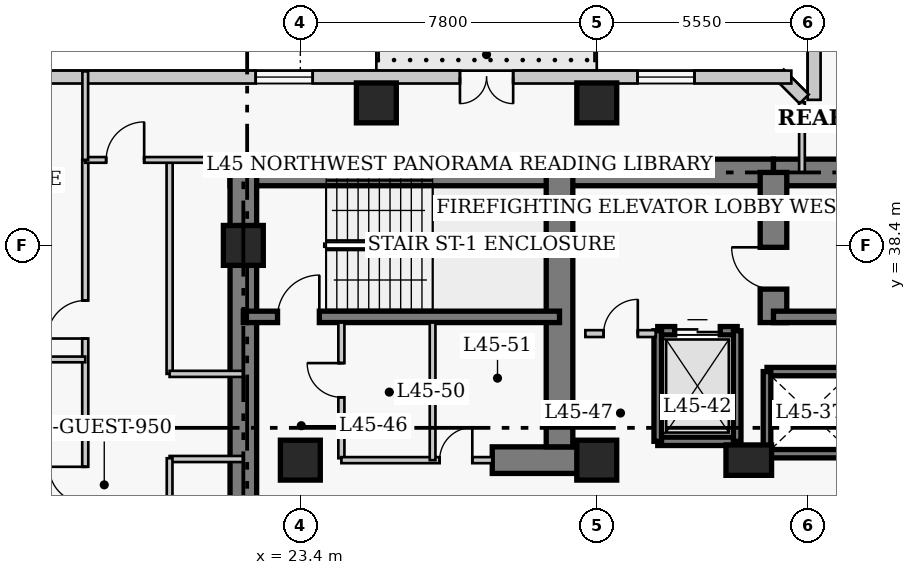
"""IFC4 building model, lengths in metres.
Left out: names, types, materials, properties, quantities, classifications, styles, units other than length and angle.
Written with IfcOpenShell. Run it as: python <this file> out.ifc"""

import sys

from ifc_helpers import new_model, si_unit, direction, frame, frame_2d, origin, origin_2d, place, context, subcontext, project, spatial, rectangle, extrude, element, fill, save


model = new_model("IFC4")
c1 = context("Model", 3, precision=1e-05, world=origin(), true_north=direction((0.0, 1.0)))
c2 = subcontext(c1, "Body", "Model", "MODEL_VIEW")
j1 = project(units=[si_unit("LENGTHUNIT", "METRE"), si_unit("PLANEANGLEUNIT", "RADIAN")], contexts=[c1])
p1 = place(None, origin())
s1 = spatial("IfcSite", under=j1, at=p1, CompositionType="ELEMENT")
p2 = place(p1, origin())
s2 = spatial("IfcBuilding", under=s1, at=p2, CompositionType="ELEMENT")
p3 = place(p2, frame((0.0, 0.0, 180.2)))
s3 = spatial("IfcBuildingStorey", under=s2, at=p3, CompositionType="ELEMENT", Elevation=180.2)
p4 = place(p3, frame((21.55, 40.32, 0.0), z_axis=(0.0, 0.0, 1.0), x_axis=(1.0, 0.0, 0.0)))
e1 = element("IfcWall", 1, at=p4, inside=s3, PredefinedType="SHEAR", context=c2, shape_type="SweptSolid", body=[
    extrude(rectangle(XDim=14.3, YDim=0.7, at=frame_2d((7.15, 0.0))), origin(), (0.0, 0.0, 1.0), 3.8),
])
p5 = place(p3, frame((35.85, 40.32, 0.0), z_axis=(0.0, 0.0, 1.0), x_axis=(1.0, 0.0, 0.0)))
e2 = element("IfcWall", 2, at=p5, inside=s3, PredefinedType="SHEAR", context=c2, shape_type="SweptSolid", body=[
    extrude(rectangle(XDim=12.6, YDim=0.7, at=frame_2d((6.3, 0.0))), origin(), (0.0, 0.0, 1.0), 3.8),
])
p6 = place(p3, frame((21.9, 27.05, 0.0), z_axis=(0.0, 0.0, 1.0), x_axis=(0.0, 1.0, 0.0)))
e3 = element("IfcWall", 3, at=p6, inside=s3, PredefinedType="SHEAR", context=c2, shape_type="SweptSolid", body=[
    extrude(rectangle(XDim=13.62, YDim=0.7, at=frame_2d((6.81, 0.0))), origin(), (0.0, 0.0, 1.0), 3.8),
])
p7 = place(p3, frame((28.45, 32.75, 0.0), z_axis=(0.0, 0.0, 1.0), x_axis=(1.0, 0.0, 0.0)))
e4 = element("IfcWall", 4, at=p7, inside=s3, PredefinedType="SHEAR", context=c2, shape_type="SweptSolid", body=[
    extrude(rectangle(XDim=2.4, YDim=0.7, at=frame_2d((1.2, 0.0))), origin(), (0.0, 0.0, 1.0), 3.8),
])
p8 = place(p3, frame((30.22, 33.1, 0.0), z_axis=(0.0, 0.0, 1.0), x_axis=(0.0, 1.0, 0.0)))
e5 = element("IfcWall", 5, at=p8, inside=s3, PredefinedType="SHEAR", context=c2, shape_type="SweptSolid", body=[
    extrude(rectangle(XDim=7.22, YDim=0.7, at=frame_2d((3.61, 0.0))), origin(), (0.0, 0.0, 1.0), 3.8),
])
p9 = place(p3, frame((35.85, 36.37, 0.0), z_axis=(0.0, 0.0, 1.0), x_axis=(0.0, 1.0, 0.0)))
e6 = element("IfcWall", 6, at=p9, inside=s3, PredefinedType="SHEAR", context=c2, shape_type="SweptSolid", body=[
    extrude(rectangle(XDim=3.95, YDim=0.7, at=frame_2d((1.975, 0.0))), origin(), (0.0, 0.0, 1.0), 3.8),
])
p10 = place(p9, frame((0.88, 0.0, 0.0)))
e7 = element("IfcOpeningElement", 7, at=p10, cuts=e6, PredefinedType="OPENING", context=c2, shape_type="SweptSolid", body=[
    extrude(rectangle(XDim=1.1, YDim=2.15, at=frame_2d((0.55, 1.075))), frame((0.0, 0.36, 0.0), z_axis=(0.0, -1.0, 0.0), x_axis=(1.0, 0.0, 0.0)), (0.0, 0.0, 1.0), 0.72),
])
p11 = place(p3, frame((21.9, 36.52, 0.0), z_axis=(0.0, 0.0, 1.0), x_axis=(1.0, 0.0, 0.0)))
e8 = element("IfcWall", 8, at=p11, inside=s3, PredefinedType="SHEAR", context=c2, shape_type="SweptSolid", body=[
    extrude(rectangle(XDim=8.32, YDim=0.3, at=frame_2d((4.16, 0.0))), origin(), (0.0, 0.0, 1.0), 3.8),
])
p12 = place(p11, frame((0.9, 0.0, 0.0)))
e9 = element("IfcOpeningElement", 9, at=p12, cuts=e8, PredefinedType="OPENING", context=c2, shape_type="SweptSolid", body=[
    extrude(rectangle(XDim=1.1, YDim=2.15, at=frame_2d((0.55, 1.075))), frame((0.0, 0.16, 0.0), z_axis=(0.0, -1.0, 0.0), x_axis=(1.0, 0.0, 0.0)), (0.0, 0.0, 1.0), 0.32),
])
p13 = place(p3, frame((35.85, 36.52, 0.0), z_axis=(0.0, 0.0, 1.0), x_axis=(1.0, 0.0, 0.0)))
e10 = element("IfcWall", 10, at=p13, inside=s3, PredefinedType="SHEAR", context=c2, shape_type="SweptSolid", body=[
    extrude(rectangle(XDim=8.33, YDim=0.3, at=frame_2d((4.165, 0.0))), origin(), (0.0, 0.0, 1.0), 3.8),
])
for number, where, z_axis, x_axis in (
    (11, (21.9, 38.4, 0.0), (0.0, 0.0, 1.0), (1.0, 0.0, 0.0)),
    (12, (23.4, 32.75, 0.0), (0.0, 0.0, 1.0), (1.0, 0.0, 0.0)),
    (13, (31.2, 32.75, 0.0), (0.0, 0.0, 1.0), (1.0, 0.0, 0.0)),
):
    element("IfcColumn", number, at=place(p3, frame(where, z_axis=z_axis, x_axis=x_axis)), inside=s3, PredefinedType="COLUMN", context=c2, shape_type="SweptSolid", body=[
        extrude(rectangle(XDim=1.05, YDim=1.05, at=origin_2d()), origin(), (0.0, 0.0, 1.0), 3.8),
    ])
p14 = place(p3, frame((35.2, 32.75, 0.0), z_axis=(0.0, 0.0, 1.0), x_axis=(1.0, 0.0, 0.0)))
e14 = element("IfcColumn", 14, at=p14, inside=s3, PredefinedType="COLUMN", context=c2, shape_type="SweptSolid", body=[
    extrude(rectangle(XDim=1.2, YDim=0.8, at=origin_2d()), origin(), (0.0, 0.0, 1.0), 3.8),
])
for number, where, z_axis, x_axis in (
    (15, (25.4, 42.15, 0.0), (0.0, 0.0, 1.0), (1.0, 0.0, 0.0)),
    (16, (31.2, 42.15, 0.0), (0.0, 0.0, 1.0), (1.0, 0.0, 0.0)),
):
    element("IfcColumn", number, at=place(p3, frame(where, z_axis=z_axis, x_axis=x_axis)), inside=s3, PredefinedType="COLUMN", context=c2, shape_type="SweptSolid", body=[
        extrude(rectangle(XDim=1.05, YDim=1.05, at=origin_2d()), origin(), (0.0, 0.0, 1.0), 3.8),
    ])
p15 = place(p3, frame((36.92, 44.37, 0.0), z_axis=(0.0, 0.0, 1.0), x_axis=(0.0, -1.0, 0.0)))
e17 = element("IfcWall", 17, at=p15, inside=s3, PredefinedType="SOLIDWALL", context=c2, shape_type="SweptSolid", body=[
    extrude(rectangle(XDim=2.14, YDim=0.34, at=frame_2d((1.07, 0.0))), origin(), (0.0, 0.0, 1.0), 3.42),
])
p16 = place(p3, frame((36.658, 42.251, 0.0), z_axis=(0.0, 0.0, 1.0), x_axis=(-0.707106781187, 0.707106781187, 0.0)))
e18 = element("IfcWall", 18, at=p16, inside=s3, PredefinedType="SOLIDWALL", context=c2, shape_type="SweptSolid", body=[
    extrude(rectangle(XDim=0.929, YDim=0.34, at=frame_2d((0.464, 0.0))), origin(), (0.0, 0.0, 1.0), 3.42),
])
p17 = place(p3, frame((36.32, 42.83, 0.0), z_axis=(0.0, 0.0, 1.0), x_axis=(-1.0, 0.0, 0.0)))
e19 = element("IfcWall", 19, at=p17, inside=s3, PredefinedType="SOLIDWALL", context=c2, shape_type="SweptSolid", body=[
    extrude(rectangle(XDim=26.69, YDim=0.34, at=frame_2d((13.345, 0.0))), origin(), (0.0, 0.0, 1.0), 3.42),
])
p18 = place(p17, frame((7.32, 0.0, 0.0)))
e20 = element("IfcOpeningElement", 20, at=p18, cuts=e19, PredefinedType="OPENING", context=c2, shape_type="SweptSolid", body=[
    extrude(rectangle(XDim=1.4, YDim=2.15, at=frame_2d((0.7, 1.075))), frame((0.0, 0.18, 0.0), z_axis=(0.0, -1.0, 0.0), x_axis=(1.0, 0.0, 0.0)), (0.0, 0.0, 1.0), 0.36),
])
p19 = place(p17, frame((2.548, 0.0, 0.85)))
e21 = element("IfcOpeningElement", 21, at=p19, cuts=e19, PredefinedType="OPENING", context=c2, shape_type="SweptSolid", body=[
    extrude(rectangle(XDim=1.5, YDim=1.75, at=frame_2d((0.75, 0.875))), frame((0.0, 0.18, 0.0), z_axis=(0.0, -1.0, 0.0), x_axis=(1.0, 0.0, 0.0)), (0.0, 0.0, 1.0), 0.36),
])
p20 = place(p17, frame((12.595, 0.0, 0.85)))
e22 = element("IfcOpeningElement", 22, at=p20, cuts=e19, PredefinedType="OPENING", context=c2, shape_type="SweptSolid", body=[
    extrude(rectangle(XDim=1.5, YDim=1.75, at=frame_2d((0.75, 0.875))), frame((0.0, 0.18, 0.0), z_axis=(0.0, -1.0, 0.0), x_axis=(1.0, 0.0, 0.0)), (0.0, 0.0, 1.0), 0.36),
])
p21 = place(p17, frame((21.492, 0.0, 0.85)))
e23 = element("IfcOpeningElement", 23, at=p21, cuts=e19, PredefinedType="OPENING", context=c2, shape_type="SweptSolid", body=[
    extrude(rectangle(XDim=1.5, YDim=1.75, at=frame_2d((0.75, 0.875))), frame((0.0, 0.18, 0.0), z_axis=(0.0, -1.0, 0.0), x_axis=(1.0, 0.0, 0.0)), (0.0, 0.0, 1.0), 0.36),
])
for number, where, z_axis, x_axis in (
    (24, (35.68, 35.08, 0.0), (0.0, 0.0, 1.0), (1.0, 0.0, 0.0)),
    (25, (35.68, 32.92, 0.0), (0.0, 0.0, 1.0), (1.0, 0.0, 0.0)),
):
    element("IfcWall", number, at=place(p3, frame(where, z_axis=z_axis, x_axis=x_axis)), inside=s3, PredefinedType="SHEAR", context=c2, shape_type="SweptSolid", body=[
        extrude(rectangle(XDim=2.32, YDim=0.22, at=frame_2d((1.16, 0.0))), origin(), (0.0, 0.0, 1.0), 3.8),
    ])
p22 = place(p3, frame((35.68, 32.92, 0.0), z_axis=(0.0, 0.0, 1.0), x_axis=(0.0, 1.0, 0.0)))
e26 = element("IfcWall", 26, at=p22, inside=s3, PredefinedType="SHEAR", context=c2, shape_type="SweptSolid", body=[
    extrude(rectangle(XDim=2.16, YDim=0.2, at=frame_2d((1.08, 0.0))), origin(), (0.0, 0.0, 1.0), 3.8),
])
p23 = place(p3, frame((32.805, 36.155, 0.0), z_axis=(0.0, 0.0, 1.0), x_axis=(1.0, 0.0, 0.0)))
e27 = element("IfcWall", 27, at=p23, inside=s3, PredefinedType="SHEAR", context=c2, shape_type="SweptSolid", body=[
    extrude(rectangle(XDim=2.09, YDim=0.22, at=frame_2d((1.045, 0.0))), origin(), (0.0, 0.0, 1.0), 3.8),
])
p24 = place(p23, frame((0.445, 0.0, 0.0)))
e28 = element("IfcOpeningElement", 28, at=p24, cuts=e27, PredefinedType="OPENING", context=c2, shape_type="SweptSolid", body=[
    extrude(rectangle(XDim=1.2, YDim=2.15, at=frame_2d((0.6, 1.075))), frame((0.0, 0.12, 0.0), z_axis=(0.0, -1.0, 0.0), x_axis=(1.0, 0.0, 0.0)), (0.0, 0.0, 1.0), 0.24),
])
p25 = place(p3, frame((32.805, 33.245, 0.0), z_axis=(0.0, 0.0, 1.0), x_axis=(1.0, 0.0, 0.0)))
e29 = element("IfcWall", 29, at=p25, inside=s3, PredefinedType="SHEAR", context=c2, shape_type="SweptSolid", body=[
    extrude(rectangle(XDim=2.09, YDim=0.22, at=frame_2d((1.045, 0.0))), origin(), (0.0, 0.0, 1.0), 3.8),
])
for number, where, z_axis, x_axis in (
    (30, (32.805, 33.245, 0.0), (0.0, 0.0, 1.0), (0.0, 1.0, 0.0)),
    (31, (34.895, 33.245, 0.0), (0.0, 0.0, 1.0), (0.0, 1.0, 0.0)),
):
    element("IfcWall", number, at=place(p3, frame(where, z_axis=z_axis, x_axis=x_axis)), inside=s3, PredefinedType="SHEAR", context=c2, shape_type="SweptSolid", body=[
        extrude(rectangle(XDim=2.91, YDim=0.2, at=frame_2d((1.455, 0.0))), origin(), (0.0, 0.0, 1.0), 3.8),
    ])
p26 = place(p3, frame((30.9, 36.08, 0.0), z_axis=(0.0, 0.0, 1.0), x_axis=(1.0, 0.0, 0.0)))
e32 = element("IfcWall", 32, at=p26, inside=s3, PredefinedType="PARTITIONING", context=c2, shape_type="SweptSolid", body=[
    extrude(rectangle(XDim=1.85, YDim=0.18, at=frame_2d((0.925, 0.0))), origin(), (0.0, 0.0, 1.0), 3.42),
])
p27 = place(p26, frame((0.48, 0.0, 0.0)))
e33 = element("IfcOpeningElement", 33, at=p27, cuts=e32, PredefinedType="OPENING", context=c2, shape_type="SweptSolid", body=[
    extrude(rectangle(XDim=0.9, YDim=2.15, at=frame_2d((0.45, 1.075))), frame((0.0, 0.1, 0.0), z_axis=(0.0, -1.0, 0.0), x_axis=(1.0, 0.0, 0.0)), (0.0, 0.0, 1.0), 0.2),
])
p28 = place(p3, frame((24.48, 32.8, 0.0), z_axis=(0.0, 0.0, 1.0), x_axis=(0.0, 1.0, 0.0)))
e34 = element("IfcWall", 34, at=p28, inside=s3, PredefinedType="PARTITIONING", context=c2, shape_type="SweptSolid", body=[
    extrude(rectangle(XDim=3.57, YDim=0.16, at=frame_2d((1.785, 0.0))), origin(), (0.0, 0.0, 1.0), 3.42),
])
p29 = place(p28, frame((1.604, 0.0, 0.0)))
e35 = element("IfcOpeningElement", 35, at=p29, cuts=e34, PredefinedType="OPENING", context=c2, shape_type="SweptSolid", body=[
    extrude(rectangle(XDim=0.9, YDim=2.1, at=frame_2d((0.45, 1.05))), frame((0.0, 0.09, 0.0), z_axis=(0.0, -1.0, 0.0), x_axis=(1.0, 0.0, 0.0)), (0.0, 0.0, 1.0), 0.18),
])
p30 = place(p3, frame((24.48, 32.75, 0.0), z_axis=(0.0, 0.0, 1.0), x_axis=(1.0, 0.0, 0.0)))
e36 = element("IfcWall", 36, at=p30, inside=s3, PredefinedType="PARTITIONING", context=c2, shape_type="SweptSolid", body=[
    extrude(rectangle(XDim=3.97, YDim=0.16, at=frame_2d((1.985, 0.0))), origin(), (0.0, 0.0, 1.0), 3.42),
])
p31 = place(p30, frame((2.585, 0.0, 0.0)))
e37 = element("IfcOpeningElement", 37, at=p31, cuts=e36, PredefinedType="OPENING", context=c2, shape_type="SweptSolid", body=[
    extrude(rectangle(XDim=0.86, YDim=2.05, at=frame_2d((0.43, 1.025))), frame((0.0, 0.09, 0.0), z_axis=(0.0, -1.0, 0.0), x_axis=(1.0, 0.0, 0.0)), (0.0, 0.0, 1.0), 0.18),
])
p32 = place(p3, frame((26.88, 32.75, 0.0), z_axis=(0.0, 0.0, 1.0), x_axis=(0.0, 1.0, 0.0)))
e38 = element("IfcWall", 38, at=p32, inside=s3, PredefinedType="PARTITIONING", context=c2, shape_type="SweptSolid", body=[
    extrude(rectangle(XDim=3.62, YDim=0.15, at=frame_2d((1.81, 0.0))), origin(), (0.0, 0.0, 1.0), 3.42),
])
p33 = place(p3, frame((17.74, 6.85, 0.0), z_axis=(0.0, 0.0, 1.0), x_axis=(0.0, 1.0, 0.0)))
e39 = element("IfcWall", 39, at=p33, inside=s3, PredefinedType="PARTITIONING", context=c2, shape_type="SweptSolid", body=[
    extrude(rectangle(XDim=33.8, YDim=0.16, at=frame_2d((16.9, 0.0))), origin(), (0.0, 0.0, 1.0), 3.42),
])
p34 = place(p33, frame((1.7, 0.0, 0.0)))
e40 = element("IfcOpeningElement", 40, at=p34, cuts=e39, PredefinedType="OPENING", context=c2, shape_type="SweptSolid", body=[
    extrude(rectangle(XDim=0.95, YDim=2.1, at=frame_2d((0.475, 1.05))), frame((0.0, 0.09, 0.0), z_axis=(0.0, -1.0, 0.0), x_axis=(1.0, 0.0, 0.0)), (0.0, 0.0, 1.0), 0.18),
])
p35 = place(p33, frame((8.275, 0.0, 0.0)))
e41 = element("IfcOpeningElement", 41, at=p35, cuts=e39, PredefinedType="OPENING", context=c2, shape_type="SweptSolid", body=[
    extrude(rectangle(XDim=0.95, YDim=2.1, at=frame_2d((0.475, 1.05))), frame((0.0, 0.09, 0.0), z_axis=(0.0, -1.0, 0.0), x_axis=(1.0, 0.0, 0.0)), (0.0, 0.0, 1.0), 0.18),
])
p36 = place(p33, frame((17.075, 0.0, 0.0)))
e42 = element("IfcOpeningElement", 42, at=p36, cuts=e39, PredefinedType="OPENING", context=c2, shape_type="SweptSolid", body=[
    extrude(rectangle(XDim=0.95, YDim=2.1, at=frame_2d((0.475, 1.05))), frame((0.0, 0.09, 0.0), z_axis=(0.0, -1.0, 0.0), x_axis=(1.0, 0.0, 0.0)), (0.0, 0.0, 1.0), 0.18),
])
p37 = place(p33, frame((24.775, 0.0, 0.0)))
e43 = element("IfcOpeningElement", 43, at=p37, cuts=e39, PredefinedType="OPENING", context=c2, shape_type="SweptSolid", body=[
    extrude(rectangle(XDim=0.95, YDim=2.1, at=frame_2d((0.475, 1.05))), frame((0.0, 0.09, 0.0), z_axis=(0.0, -1.0, 0.0), x_axis=(1.0, 0.0, 0.0)), (0.0, 0.0, 1.0), 0.18),
])
p38 = place(p33, frame((29.1, 0.0, 0.0)))
e44 = element("IfcOpeningElement", 44, at=p38, cuts=e39, PredefinedType="OPENING", context=c2, shape_type="SweptSolid", body=[
    extrude(rectangle(XDim=1.0, YDim=2.15, at=frame_2d((0.5, 1.075))), frame((0.0, 0.09, 0.0), z_axis=(0.0, -1.0, 0.0), x_axis=(1.0, 0.0, 0.0)), (0.0, 0.0, 1.0), 0.18),
])
p39 = place(p3, frame((19.96, 35.02, 0.0), z_axis=(0.0, 0.0, 1.0), x_axis=(0.0, 1.0, 0.0)))
e45 = element("IfcWall", 45, at=p39, inside=s3, PredefinedType="PARTITIONING", context=c2, shape_type="SweptSolid", body=[
    extrude(rectangle(XDim=5.63, YDim=0.16, at=frame_2d((2.815, 0.0))), origin(), (0.0, 0.0, 1.0), 3.42),
])
for number, where, z_axis, x_axis in (
    (46, (19.96, 35.02, 0.0), (0.0, 0.0, 1.0), (1.0, 0.0, 0.0)),
    (47, (19.96, 32.78, 0.0), (0.0, 0.0, 1.0), (1.0, 0.0, 0.0)),
):
    element("IfcWall", number, at=place(p3, frame(where, z_axis=z_axis, x_axis=x_axis)), inside=s3, PredefinedType="PARTITIONING", context=c2, shape_type="SweptSolid", body=[
        extrude(rectangle(XDim=1.94, YDim=0.16, at=frame_2d((0.97, 0.0))), origin(), (0.0, 0.0, 1.0), 3.42),
    ])
p40 = place(p3, frame((17.74, 40.65, 0.0), z_axis=(0.0, 0.0, 1.0), x_axis=(1.0, 0.0, 0.0)))
e48 = element("IfcWall", 48, at=p40, inside=s3, PredefinedType="PARTITIONING", context=c2, shape_type="SweptSolid", body=[
    extrude(rectangle(XDim=4.36, YDim=0.15, at=frame_2d((2.18, 0.0))), origin(), (0.0, 0.0, 1.0), 3.42),
])
p41 = place(p40, frame((0.55, 0.0, 0.0)))
e49 = element("IfcOpeningElement", 49, at=p41, cuts=e48, PredefinedType="OPENING", context=c2, shape_type="SweptSolid", body=[
    extrude(rectangle(XDim=1.0, YDim=2.15, at=frame_2d((0.5, 1.075))), frame((0.0, 0.085, 0.0), z_axis=(0.0, -1.0, 0.0), x_axis=(1.0, 0.0, 0.0)), (0.0, 0.0, 1.0), 0.17),
])
p42 = place(p3, frame((19.96, 19.16, 0.0), z_axis=(0.0, 0.0, 1.0), x_axis=(0.0, 1.0, 0.0)))
e50 = element("IfcWall", 50, at=p42, inside=s3, PredefinedType="PARTITIONING", context=c2, shape_type="SweptSolid", body=[
    extrude(rectangle(XDim=13.64, YDim=0.15, at=frame_2d((6.82, 0.0))), origin(), (0.0, 0.0, 1.0), 3.42),
])
p43 = place(p3, frame((17.74, 40.65, 0.0), z_axis=(0.0, 0.0, 1.0), x_axis=(0.0, 1.0, 0.0)))
e51 = element("IfcWall", 51, at=p43, inside=s3, PredefinedType="PARTITIONING", context=c2, shape_type="SweptSolid", body=[
    extrude(rectangle(XDim=2.33, YDim=0.15, at=frame_2d((1.165, 0.0))), origin(), (0.0, 0.0, 1.0), 3.42),
])
p44 = place(p3, frame((36.6, 40.32, 0.0), z_axis=(0.0, 0.0, 1.0), x_axis=(0.0, 1.0, 0.0)))
e52 = element("IfcWall", 52, at=p44, inside=s3, PredefinedType="PARTITIONING", context=c2, shape_type="SweptSolid", body=[
    extrude(rectangle(XDim=1.845, YDim=0.15, at=frame_2d((0.922, 0.0))), origin(), (0.0, 0.0, 1.0), 3.42),
])
p45 = place(p3, frame((14.45, 35.4, 0.0), z_axis=(0.0, 0.0, 1.0), x_axis=(1.0, 0.0, 0.0)))
e53 = element("IfcWall", 53, at=p45, inside=s3, PredefinedType="PARTITIONING", context=c2, shape_type="SweptSolid", body=[
    extrude(rectangle(XDim=3.29, YDim=0.15, at=frame_2d((1.645, 0.0))), origin(), (0.0, 0.0, 1.0), 3.42),
])
p46 = place(p18, origin())
e54 = element("IfcDoor", 54, at=p46, inside=s3, OperationType="DOUBLE_DOOR_SINGLE_SWING", PredefinedType="DOOR", context=c2, shape_type="SweptSolid", body=[
    extrude(rectangle(XDim=1.4, YDim=2.15, at=frame_2d((0.7, 1.075))), frame((0.0, 0.025, 0.0), z_axis=(0.0, -1.0, 0.0), x_axis=(1.0, 0.0, 0.0)), (0.0, 0.0, 1.0), 0.05),
])
fill(e20, e54)
p47 = place(p19, origin())
e55 = element("IfcWindow", 55, at=p47, inside=s3, PartitioningType="SINGLE_PANEL", PredefinedType="WINDOW", context=c2, shape_type="SweptSolid", body=[
    extrude(rectangle(XDim=1.5, YDim=1.75, at=frame_2d((0.75, 0.875))), frame((0.0, 0.03, 0.0), z_axis=(0.0, -1.0, 0.0), x_axis=(1.0, 0.0, 0.0)), (0.0, 0.0, 1.0), 0.06),
])
fill(e21, e55)
p48 = place(p20, origin())
e56 = element("IfcWindow", 56, at=p48, inside=s3, PartitioningType="SINGLE_PANEL", PredefinedType="WINDOW", context=c2, shape_type="SweptSolid", body=[
    extrude(rectangle(XDim=1.5, YDim=1.75, at=frame_2d((0.75, 0.875))), frame((0.0, 0.03, 0.0), z_axis=(0.0, -1.0, 0.0), x_axis=(1.0, 0.0, 0.0)), (0.0, 0.0, 1.0), 0.06),
])
fill(e22, e56)
p49 = place(p24, origin())
e57 = element("IfcDoor", 57, at=p49, inside=s3, OperationType="DOUBLE_DOOR_SLIDING", PredefinedType="DOOR", context=c2, shape_type="SweptSolid", body=[
    extrude(rectangle(XDim=1.2, YDim=2.15, at=frame_2d((0.6, 1.075))), frame((0.0, 0.025, 0.0), z_axis=(0.0, -1.0, 0.0), x_axis=(1.0, 0.0, 0.0)), (0.0, 0.0, 1.0), 0.05),
])
fill(e28, e57)
p50 = place(p27, origin())
e58 = element("IfcDoor", 58, at=p50, inside=s3, OperationType="SINGLE_SWING_RIGHT", PredefinedType="DOOR", context=c2, shape_type="SweptSolid", body=[
    extrude(rectangle(XDim=0.9, YDim=2.15, at=frame_2d((0.45, 1.075))), frame((0.0, 0.025, 0.0), z_axis=(0.0, -1.0, 0.0), x_axis=(1.0, 0.0, 0.0)), (0.0, 0.0, 1.0), 0.05),
])
fill(e33, e58)
p51 = place(p29, origin())
e59 = element("IfcDoor", 59, at=p51, inside=s3, OperationType="SINGLE_SWING_RIGHT", PredefinedType="DOOR", context=c2, shape_type="SweptSolid", body=[
    extrude(rectangle(XDim=0.9, YDim=2.1, at=frame_2d((0.45, 1.05))), frame((0.0, 0.025, 0.0), z_axis=(0.0, -1.0, 0.0), x_axis=(1.0, 0.0, 0.0)), (0.0, 0.0, 1.0), 0.05),
])
fill(e35, e59)
p52 = place(p31, origin())
e60 = element("IfcDoor", 60, at=p52, inside=s3, OperationType="SINGLE_SWING_RIGHT", PredefinedType="DOOR", context=c2, shape_type="SweptSolid", body=[
    extrude(rectangle(XDim=0.86, YDim=2.05, at=frame_2d((0.43, 1.025))), frame((0.0, 0.025, 0.0), z_axis=(0.0, -1.0, 0.0), x_axis=(1.0, 0.0, 0.0)), (0.0, 0.0, 1.0), 0.05),
])
fill(e37, e60)
p53 = place(p41, origin())
e61 = element("IfcDoor", 61, at=p53, inside=s3, OperationType="SINGLE_SWING_RIGHT", PredefinedType="DOOR", context=c2, shape_type="SweptSolid", body=[
    extrude(rectangle(XDim=1.0, YDim=2.15, at=frame_2d((0.5, 1.075))), frame((0.0, 0.025, 0.0), z_axis=(0.0, -1.0, 0.0), x_axis=(1.0, 0.0, 0.0)), (0.0, 0.0, 1.0), 0.05),
])
fill(e49, e61)
p54 = place(p37, origin())
e62 = element("IfcDoor", 62, at=p54, inside=s3, OperationType="SINGLE_SWING_RIGHT", PredefinedType="DOOR", context=c2, shape_type="SweptSolid", body=[
    extrude(rectangle(XDim=0.95, YDim=2.1, at=frame_2d((0.475, 1.05))), frame((0.0, 0.025, 0.0), z_axis=(0.0, -1.0, 0.0), x_axis=(1.0, 0.0, 0.0)), (0.0, 0.0, 1.0), 0.05),
])
fill(e43, e62)
p55 = place(p38, origin())
e63 = element("IfcDoor", 63, at=p55, inside=s3, OperationType="SINGLE_SWING_LEFT", PredefinedType="DOOR", context=c2, shape_type="SweptSolid", body=[
    extrude(rectangle(XDim=1.0, YDim=2.15, at=frame_2d((0.5, 1.075))), frame((0.0, 0.025, 0.0), z_axis=(0.0, -1.0, 0.0), x_axis=(1.0, 0.0, 0.0)), (0.0, 0.0, 1.0), 0.05),
])
fill(e44, e63)
p56 = place(p12, origin())
e64 = element("IfcDoor", 64, at=p56, inside=s3, OperationType="SINGLE_SWING_RIGHT", PredefinedType="DOOR", context=c2, shape_type="SweptSolid", body=[
    extrude(rectangle(XDim=1.1, YDim=2.15, at=frame_2d((0.55, 1.075))), frame((0.0, 0.025, 0.0), z_axis=(0.0, -1.0, 0.0), x_axis=(1.0, 0.0, 0.0)), (0.0, 0.0, 1.0), 0.05),
])
fill(e9, e64)
p57 = place(p10, origin())
e65 = element("IfcDoor", 65, at=p57, inside=s3, OperationType="SINGLE_SWING_RIGHT", PredefinedType="DOOR", context=c2, shape_type="SweptSolid", body=[
    extrude(rectangle(XDim=1.1, YDim=2.15, at=frame_2d((0.55, 1.075))), frame((0.0, 0.025, 0.0), z_axis=(0.0, -1.0, 0.0), x_axis=(1.0, 0.0, 0.0)), (0.0, 0.0, 1.0), 0.05),
])
fill(e7, e65)
save(model, sys.argv[1])
